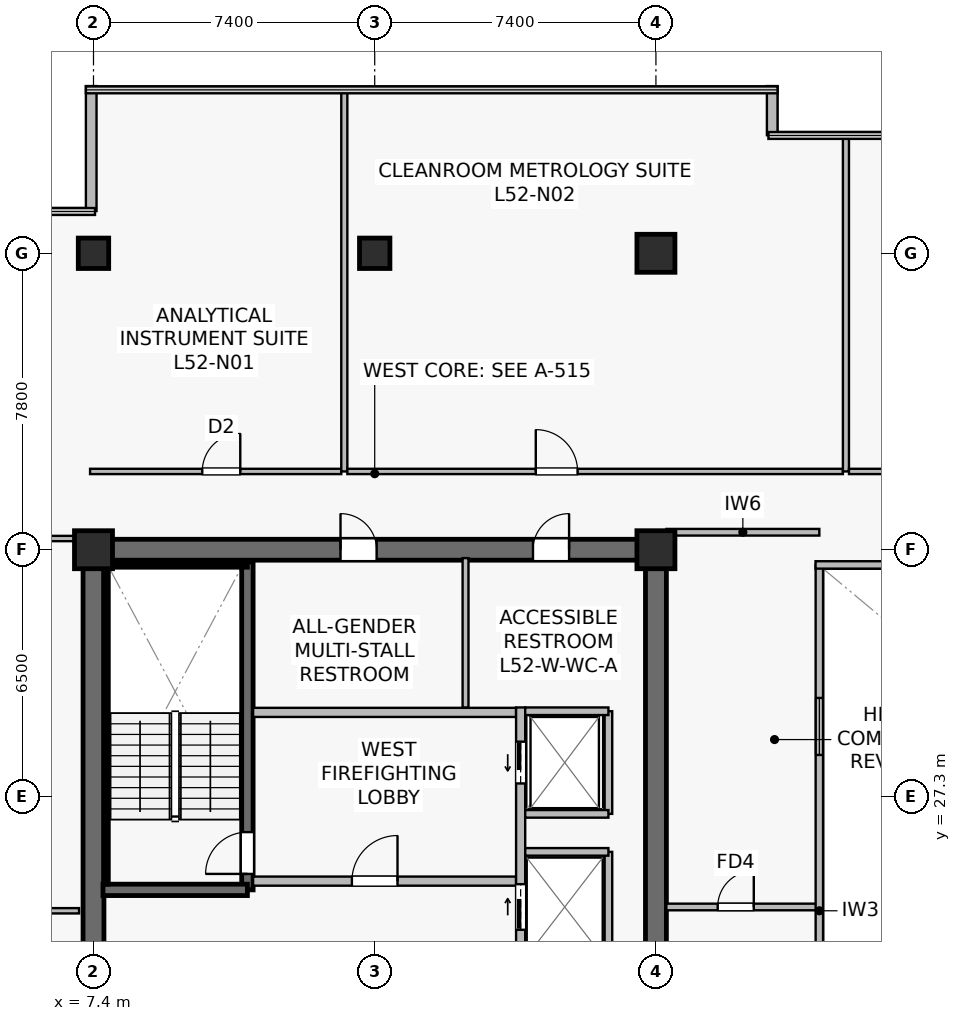
"""IFC4 building model, lengths in metres.
Left out: names, types, materials, properties, quantities, classifications, styles, units other than length and angle.
Written with IfcOpenShell. Run it as: python <this file> out.ifc"""

import sys

from ifc_helpers import new_model, si_unit, direction, frame, frame_2d, origin, origin_2d, place, context, subcontext, project, spatial, rectangle, extrude, source, transform, mapped, element, fill, save


model = new_model("IFC4")
c1 = context("Model", 3, precision=1e-05, world=origin(), true_north=direction((0.0, 1.0)))
c2 = subcontext(c1, "Body", "Model", "MODEL_VIEW")
j1 = project(units=[si_unit("LENGTHUNIT", "METRE"), si_unit("PLANEANGLEUNIT", "RADIAN")], contexts=[c1])
p1 = place(None, origin())
s1 = spatial("IfcSite", under=j1, at=p1, CompositionType="ELEMENT")
p2 = place(p1, origin())
s2 = spatial("IfcBuilding", under=s1, at=p2, CompositionType="ELEMENT")
p3 = place(p2, frame((0.0, 0.0, 217.8)))
s3 = spatial("IfcBuildingStorey", under=s2, at=p3, CompositionType="ELEMENT", Elevation=217.8)
p4 = place(p3, frame((7.125, 33.8, 0.0), z_axis=(0.0, 0.0, 1.0), x_axis=(1.0, 0.0, 0.0)))
e1 = element("IfcWall", 1, at=p4, inside=s3, PredefinedType="SHEAR", context=c2, shape_type="SweptSolid", body=[
    extrude(rectangle(XDim=15.35, YDim=0.55, at=frame_2d((7.675, 0.0))), origin(), (0.0, 0.0, 1.0), 3.8),
])
p5 = place(p4, frame((6.775, 0.0, 0.0)))
e2 = element("IfcOpeningElement", 2, at=p5, cuts=e1, PredefinedType="OPENING", context=c2, shape_type="SweptSolid", body=[
    extrude(rectangle(XDim=0.95, YDim=2.15, at=frame_2d((0.475, 1.075))), frame((0.0, 0.285, 0.0), z_axis=(0.0, -1.0, 0.0), x_axis=(1.0, 0.0, 0.0)), (0.0, 0.0, 1.0), 0.57),
])
p6 = place(p4, frame((11.84, 0.0, 0.0)))
e3 = element("IfcOpeningElement", 3, at=p6, cuts=e1, PredefinedType="OPENING", context=c2, shape_type="SweptSolid", body=[
    extrude(rectangle(XDim=0.95, YDim=2.15, at=frame_2d((0.475, 1.075))), frame((0.0, 0.285, 0.0), z_axis=(0.0, -1.0, 0.0), x_axis=(1.0, 0.0, 0.0)), (0.0, 0.0, 1.0), 0.57),
])
p7 = place(p3, frame((7.4, 15.075, 0.0), z_axis=(0.0, 0.0, 1.0), x_axis=(0.0, 1.0, 0.0)))
e4 = element("IfcWall", 4, at=p7, inside=s3, PredefinedType="SHEAR", context=c2, shape_type="SweptSolid", body=[
    extrude(rectangle(XDim=18.45, YDim=0.55, at=frame_2d((9.225, 0.0))), origin(), (0.0, 0.0, 1.0), 3.8),
])
p8 = place(p3, frame((22.2, 15.075, 0.0), z_axis=(0.0, 0.0, 1.0), x_axis=(0.0, 1.0, 0.0)))
e5 = element("IfcWall", 5, at=p8, inside=s3, PredefinedType="SHEAR", context=c2, shape_type="SweptSolid", body=[
    extrude(rectangle(XDim=18.45, YDim=0.55, at=frame_2d((9.225, 0.0))), origin(), (0.0, 0.0, 1.0), 3.8),
])
p9 = place(p8, frame((3.475, 0.0, 0.0)))
e6 = element("IfcOpeningElement", 6, at=p9, cuts=e5, PredefinedType="OPENING", context=c2, shape_type="SweptSolid", body=[
    extrude(rectangle(XDim=1.42, YDim=2.2, at=frame_2d((0.71, 1.1))), frame((0.0, 0.285, 0.0), z_axis=(0.0, -1.0, 0.0), x_axis=(1.0, 0.0, 0.0)), (0.0, 0.0, 1.0), 0.57),
])
p10 = place(p3, frame((11.45, 24.85, 0.0), z_axis=(0.0, 0.0, 1.0), x_axis=(0.0, 1.0, 0.0)))
e7 = element("IfcWall", 7, at=p10, inside=s3, PredefinedType="SHEAR", context=c2, shape_type="SweptSolid", body=[
    extrude(rectangle(XDim=8.63, YDim=0.3, at=frame_2d((4.315, 0.0))), origin(), (0.0, 0.0, 1.0), 3.8),
])
p11 = place(p10, frame((0.42, 0.0, 0.0)))
e8 = element("IfcOpeningElement", 8, at=p11, cuts=e7, PredefinedType="OPENING", context=c2, shape_type="SweptSolid", body=[
    extrude(rectangle(XDim=1.1, YDim=2.15, at=frame_2d((0.55, 1.075))), frame((0.0, 0.16, 0.0), z_axis=(0.0, -1.0, 0.0), x_axis=(1.0, 0.0, 0.0)), (0.0, 0.0, 1.0), 0.32),
])
p12 = place(p3, frame((7.65, 24.85, 0.0), z_axis=(0.0, 0.0, 1.0), x_axis=(1.0, 0.0, 0.0)))
e9 = element("IfcWall", 9, at=p12, inside=s3, PredefinedType="SHEAR", context=c2, shape_type="SweptSolid", body=[
    extrude(rectangle(XDim=3.8, YDim=0.3, at=frame_2d((1.9, 0.0))), origin(), (0.0, 0.0, 1.0), 3.8),
])
p13 = place(p3, frame((7.73, 33.4, 0.0), z_axis=(0.0, 0.0, 1.0), x_axis=(1.0, 0.0, 0.0)))
e10 = element("IfcWall", 10, at=p13, inside=s3, PredefinedType="SOLIDWALL", context=c2, shape_type="SweptSolid", body=[
    extrude(rectangle(XDim=3.72, YDim=0.12, at=frame_2d((1.86, 0.0))), origin(), (0.0, 0.0, 1.0), 3.8),
])
p14 = place(p3, frame((7.73, 25.0, 0.0), z_axis=(0.0, 0.0, 1.0), x_axis=(0.0, 1.0, 0.0)))
e11 = element("IfcWall", 11, at=p14, inside=s3, PredefinedType="SOLIDWALL", context=c2, shape_type="SweptSolid", body=[
    extrude(rectangle(XDim=8.32, YDim=0.12, at=frame_2d((4.16, 0.0))), origin(), (0.0, 0.0, 1.0), 3.8),
])
m1 = source(origin(), c2, "Body", "SweptSolid", [
    extrude(rectangle(XDim=1.0, YDim=1.0, at=origin_2d()), origin(), (0.0, 0.0, 1.0), 4.1),
])
for number, where, z_axis, x_axis in (
    (12, (7.4, 33.8, 0.0), (0.0, 0.0, 1.0), (1.0, 0.0, 0.0)),
    (13, (22.2, 33.8, 0.0), (0.0, 0.0, 1.0), (1.0, 0.0, 0.0)),
):
    element("IfcColumn", number, at=place(p3, frame(where, z_axis=z_axis, x_axis=x_axis)), inside=s3, PredefinedType="COLUMN", context=c2, shape_type="MappedRepresentation", body=[
        mapped(m1, transform((0.0, 0.0, 0.0), scale=1.0)),
    ])
m2 = source(origin(), c2, "Body", "SweptSolid", [
    extrude(rectangle(XDim=0.8, YDim=0.8, at=origin_2d()), origin(), (0.0, 0.0, 1.0), 4.1),
])
p15 = place(p3, frame((14.8, 41.6, 0.0), z_axis=(0.0, 0.0, 1.0), x_axis=(1.0, 0.0, 0.0)))
e14 = element("IfcColumn", 14, at=p15, inside=s3, PredefinedType="COLUMN", context=c2, shape_type="MappedRepresentation", body=[
    mapped(m2, transform((0.0, 0.0, 0.0), scale=1.0)),
])
p16 = place(p3, frame((22.2, 41.6, 0.0), z_axis=(0.0, 0.0, 1.0), x_axis=(1.0, 0.0, 0.0)))
e15 = element("IfcColumn", 15, at=p16, inside=s3, PredefinedType="COLUMN", context=c2, shape_type="MappedRepresentation", body=[
    mapped(m1, transform((0.0, 0.0, 0.0), scale=1.0)),
])
p17 = place(p3, frame((7.4, 41.6, 0.0), z_axis=(0.0, 0.0, 1.0), x_axis=(1.0, 0.0, 0.0)))
e16 = element("IfcColumn", 16, at=p17, inside=s3, PredefinedType="COLUMN", context=c2, shape_type="MappedRepresentation", body=[
    mapped(m2, transform((0.0, 0.0, 0.0), scale=1.0)),
])
p18 = place(p3, frame((25.26, 44.707, 0.0), z_axis=(0.0, 0.0, 1.0), x_axis=(0.0, 1.0, 0.0)))
e17 = element("IfcWall", 17, at=p18, inside=s3, PredefinedType="STANDARD", context=c2, shape_type="SweptSolid", body=[
    extrude(rectangle(XDim=1.293, YDim=0.28, at=frame_2d((0.646, 0.0))), origin(), (0.0, 0.0, 1.0), 3.8),
])
p19 = place(p3, frame((7.34, 46.0, 0.0), z_axis=(0.0, 0.0, 1.0), x_axis=(0.0, -1.0, 0.0)))
e18 = element("IfcWall", 18, at=p19, inside=s3, PredefinedType="STANDARD", context=c2, shape_type="SweptSolid", body=[
    extrude(rectangle(XDim=3.288, YDim=0.28, at=frame_2d((1.644, 0.0))), origin(), (0.0, 0.0, 1.0), 3.8),
])
p20 = place(p3, frame((11.6, 25.08, 0.0), z_axis=(0.0, 0.0, 1.0), x_axis=(1.0, 0.0, 0.0)))
e19 = element("IfcWall", 19, at=p20, inside=s3, PredefinedType="SOLIDWALL", context=c2, shape_type="SweptSolid", body=[
    extrude(rectangle(XDim=6.92, YDim=0.24, at=frame_2d((3.46, 0.0))), origin(), (0.0, 0.0, 1.0), 3.197),
])
p21 = place(p20, frame((2.6, 0.0, 0.0)))
e20 = element("IfcOpeningElement", 20, at=p21, cuts=e19, PredefinedType="OPENING", context=c2, shape_type="SweptSolid", body=[
    extrude(rectangle(XDim=1.2, YDim=2.16, at=frame_2d((0.6, 1.08))), frame((0.0, 0.13, 0.0), z_axis=(0.0, -1.0, 0.0), x_axis=(1.0, 0.0, 0.0)), (0.0, 0.0, 1.0), 0.26),
])
p22 = place(p3, frame((11.6, 29.52, 0.0), z_axis=(0.0, 0.0, 1.0), x_axis=(1.0, 0.0, 0.0)))
e21 = element("IfcWall", 21, at=p22, inside=s3, PredefinedType="SOLIDWALL", context=c2, shape_type="SweptSolid", body=[
    extrude(rectangle(XDim=6.92, YDim=0.24, at=frame_2d((3.46, 0.0))), origin(), (0.0, 0.0, 1.0), 3.197),
])
p23 = place(p3, frame((18.64, 22.8, 0.0), z_axis=(0.0, 0.0, 1.0), x_axis=(0.0, 1.0, 0.0)))
e22 = element("IfcWall", 22, at=p23, inside=s3, PredefinedType="SOLIDWALL", context=c2, shape_type="SweptSolid", body=[
    extrude(rectangle(XDim=6.85, YDim=0.24, at=frame_2d((3.425, 0.0))), origin(), (0.0, 0.0, 1.0), 2.935),
])
p24 = place(p23, frame((4.85, 0.0, 0.0)))
e23 = element("IfcOpeningElement", 23, at=p24, cuts=e22, PredefinedType="OPENING", context=c2, shape_type="SweptSolid", body=[
    extrude(rectangle(XDim=1.1, YDim=2.22, at=frame_2d((0.55, 1.11))), frame((0.0, 0.13, 0.0), z_axis=(0.0, -1.0, 0.0), x_axis=(1.0, 0.0, 0.0)), (0.0, 0.0, 1.0), 0.26),
])
p25 = place(p23, frame((1.0, 0.0, 0.0)))
e24 = element("IfcOpeningElement", 24, at=p25, cuts=e22, PredefinedType="OPENING", context=c2, shape_type="SweptSolid", body=[
    extrude(rectangle(XDim=1.2, YDim=2.22, at=frame_2d((0.6, 1.11))), frame((0.0, 0.13, 0.0), z_axis=(0.0, -1.0, 0.0), x_axis=(1.0, 0.0, 0.0)), (0.0, 0.0, 1.0), 0.26),
])
p26 = place(p3, frame((20.95, 26.85, 0.0), z_axis=(0.0, 0.0, 1.0), x_axis=(0.0, 1.0, 0.0)))
e25 = element("IfcWall", 25, at=p26, inside=s3, PredefinedType="SOLIDWALL", context=c2, shape_type="SweptSolid", body=[
    extrude(rectangle(XDim=2.7, YDim=0.2, at=frame_2d((1.35, 0.0))), origin(), (0.0, 0.0, 1.0), 3.8),
])
p27 = place(p3, frame((18.76, 29.55, 0.0), z_axis=(0.0, 0.0, 1.0), x_axis=(1.0, 0.0, 0.0)))
e26 = element("IfcWall", 26, at=p27, inside=s3, PredefinedType="SOLIDWALL", context=c2, shape_type="SweptSolid", body=[
    extrude(rectangle(XDim=2.19, YDim=0.2, at=frame_2d((1.095, 0.0))), origin(), (0.0, 0.0, 1.0), 3.8),
])
p28 = place(p3, frame((18.76, 26.85, 0.0), z_axis=(0.0, 0.0, 1.0), x_axis=(1.0, 0.0, 0.0)))
e27 = element("IfcWall", 27, at=p28, inside=s3, PredefinedType="SOLIDWALL", context=c2, shape_type="SweptSolid", body=[
    extrude(rectangle(XDim=2.19, YDim=0.2, at=frame_2d((1.095, 0.0))), origin(), (0.0, 0.0, 1.0), 3.197),
])
p29 = place(p3, frame((20.95, 22.95, 0.0), z_axis=(0.0, 0.0, 1.0), x_axis=(0.0, 1.0, 0.0)))
e28 = element("IfcWall", 28, at=p29, inside=s3, PredefinedType="SOLIDWALL", context=c2, shape_type="SweptSolid", body=[
    extrude(rectangle(XDim=2.9, YDim=0.2, at=frame_2d((1.45, 0.0))), origin(), (0.0, 0.0, 1.0), 2.935),
])
p30 = place(p3, frame((18.76, 25.85, 0.0), z_axis=(0.0, 0.0, 1.0), x_axis=(1.0, 0.0, 0.0)))
e29 = element("IfcWall", 29, at=p30, inside=s3, PredefinedType="SOLIDWALL", context=c2, shape_type="SweptSolid", body=[
    extrude(rectangle(XDim=2.19, YDim=0.2, at=frame_2d((1.095, 0.0))), origin(), (0.0, 0.0, 1.0), 3.8),
])
p31 = place(p3, frame((17.19, 29.65, 0.0), z_axis=(0.0, 0.0, 1.0), x_axis=(0.0, 1.0, 0.0)))
e30 = element("IfcWall", 30, at=p31, inside=s3, PredefinedType="PLUMBINGWALL", context=c2, shape_type="SweptSolid", body=[
    extrude(rectangle(XDim=3.93, YDim=0.155, at=frame_2d((1.965, 0.0))), origin(), (0.0, 0.0, 1.0), 3.8),
])
p32 = place(p3, frame((22.475, 34.26, 0.0), z_axis=(0.0, 0.0, 1.0), x_axis=(1.0, 0.0, 0.0)))
e31 = element("IfcWall", 31, at=p32, inside=s3, PredefinedType="PARTITIONING", context=c2, shape_type="SweptSolid", body=[
    extrude(rectangle(XDim=4.025, YDim=0.175, at=frame_2d((2.012, 0.0))), origin(), (0.0, 0.0, 1.0), 3.485),
])
p33 = place(p3, frame((22.475, 24.4, 0.0), z_axis=(0.0, 0.0, 1.0), x_axis=(1.0, 0.0, 0.0)))
e32 = element("IfcWall", 32, at=p33, inside=s3, PredefinedType="PARTITIONING", context=c2, shape_type="SweptSolid", body=[
    extrude(rectangle(XDim=4.025, YDim=0.175, at=frame_2d((2.012, 0.0))), origin(), (0.0, 0.0, 1.0), 3.8),
])
p34 = place(p33, frame((1.35, 0.0, 0.0)))
e33 = element("IfcOpeningElement", 33, at=p34, cuts=e32, PredefinedType="OPENING", context=c2, shape_type="SweptSolid", body=[
    extrude(rectangle(XDim=0.95, YDim=2.15, at=frame_2d((0.475, 1.075))), frame((0.0, 0.098, 0.0), z_axis=(0.0, -1.0, 0.0), x_axis=(1.0, 0.0, 0.0)), (0.0, 0.0, 1.0), 0.195),
])
p35 = place(p3, frame((26.5, 15.2, 0.0), z_axis=(0.0, 0.0, 1.0), x_axis=(0.0, 1.0, 0.0)))
e34 = element("IfcWall", 34, at=p35, inside=s3, PredefinedType="SOLIDWALL", context=c2, shape_type="SweptSolid", body=[
    extrude(rectangle(XDim=18.2, YDim=0.195, at=frame_2d((9.1, 0.0))), origin(), (0.0, 0.0, 1.0), 3.8),
])
p36 = place(p35, frame((1.8, 0.0, 0.9)))
e35 = element("IfcOpeningElement", 35, at=p36, cuts=e34, PredefinedType="OPENING", context=c2, shape_type="SweptSolid", body=[
    extrude(rectangle(XDim=1.5, YDim=1.4, at=frame_2d((0.75, 0.7))), frame((0.0, 0.107, 0.0), z_axis=(0.0, -1.0, 0.0), x_axis=(1.0, 0.0, 0.0)), (0.0, 0.0, 1.0), 0.215),
])
p37 = place(p35, frame((13.2, 0.0, 0.9)))
e36 = element("IfcOpeningElement", 36, at=p37, cuts=e34, PredefinedType="OPENING", context=c2, shape_type="SweptSolid", body=[
    extrude(rectangle(XDim=1.5, YDim=1.4, at=frame_2d((0.75, 0.7))), frame((0.0, 0.107, 0.0), z_axis=(0.0, -1.0, 0.0), x_axis=(1.0, 0.0, 0.0)), (0.0, 0.0, 1.0), 0.215),
])
p38 = place(p3, frame((26.4, 33.4, 0.0), z_axis=(0.0, 0.0, 1.0), x_axis=(1.0, 0.0, 0.0)))
e37 = element("IfcWall", 37, at=p38, inside=s3, PredefinedType="SOLIDWALL", context=c2, shape_type="SweptSolid", body=[
    extrude(rectangle(XDim=22.0, YDim=0.195, at=frame_2d((11.0, 0.0))), origin(), (0.0, 0.0, 1.0), 3.8),
])
p39 = place(p3, frame((7.31, 35.86, 0.0), z_axis=(0.0, 0.0, 1.0), x_axis=(1.0, 0.0, 0.0)))
e38 = element("IfcWall", 38, at=p39, inside=s3, PredefinedType="PARTITIONING", context=c2, shape_type="SweptSolid", body=[
    extrude(rectangle(XDim=6.61, YDim=0.14, at=frame_2d((3.305, 0.0))), origin(), (0.0, 0.0, 1.0), 3.335),
])
p40 = place(p39, frame((2.952, 0.0, 0.0)))
e39 = element("IfcOpeningElement", 39, at=p40, cuts=e38, PredefinedType="OPENING", context=c2, shape_type="SweptSolid", body=[
    extrude(rectangle(XDim=1.0, YDim=2.15, at=frame_2d((0.5, 1.075))), frame((0.0, 0.08, 0.0), z_axis=(0.0, -1.0, 0.0), x_axis=(1.0, 0.0, 0.0)), (0.0, 0.0, 1.0), 0.16),
])
p41 = place(p3, frame((14.0, 35.86, 0.0), z_axis=(0.0, 0.0, 1.0), x_axis=(0.0, 1.0, 0.0)))
e40 = element("IfcWall", 40, at=p41, inside=s3, PredefinedType="PARTITIONING", context=c2, shape_type="SweptSolid", body=[
    extrude(rectangle(XDim=10.03, YDim=0.16, at=frame_2d((5.015, 0.0))), origin(), (0.0, 0.0, 1.0), 3.135),
])
p42 = place(p3, frame((14.08, 35.86, 0.0), z_axis=(0.0, 0.0, 1.0), x_axis=(1.0, 0.0, 0.0)))
e41 = element("IfcWall", 41, at=p42, inside=s3, PredefinedType="PARTITIONING", context=c2, shape_type="SweptSolid", body=[
    extrude(rectangle(XDim=13.04, YDim=0.14, at=frame_2d((6.52, 0.0))), origin(), (0.0, 0.0, 1.0), 3.197),
])
p43 = place(p42, frame((4.958, 0.0, 0.0)))
e42 = element("IfcOpeningElement", 42, at=p43, cuts=e41, PredefinedType="OPENING", context=c2, shape_type="SweptSolid", body=[
    extrude(rectangle(XDim=1.1, YDim=2.18, at=frame_2d((0.55, 1.09))), frame((0.0, 0.08, 0.0), z_axis=(0.0, -1.0, 0.0), x_axis=(1.0, 0.0, 0.0)), (0.0, 0.0, 1.0), 0.16),
])
p44 = place(p3, frame((27.2, 35.86, 0.0), z_axis=(0.0, 0.0, 1.0), x_axis=(0.0, 1.0, 0.0)))
e43 = element("IfcWall", 43, at=p44, inside=s3, PredefinedType="PARTITIONING", context=c2, shape_type="SweptSolid", body=[
    extrude(rectangle(XDim=8.83, YDim=0.16, at=frame_2d((4.415, 0.0))), origin(), (0.0, 0.0, 1.0), 3.135),
])
p45 = place(p3, frame((27.28, 35.86, 0.0), z_axis=(0.0, 0.0, 1.0), x_axis=(1.0, 0.0, 0.0)))
e44 = element("IfcWall", 44, at=p45, inside=s3, PredefinedType="PARTITIONING", context=c2, shape_type="SweptSolid", body=[
    extrude(rectangle(XDim=14.24, YDim=0.14, at=frame_2d((7.12, 0.0))), origin(), (0.0, 0.0, 1.0), 3.197),
])
p46 = place(p45, frame((6.943, 0.0, 0.0)))
e45 = element("IfcOpeningElement", 45, at=p46, cuts=e44, PredefinedType="OPENING", context=c2, shape_type="SweptSolid", body=[
    extrude(rectangle(XDim=1.1, YDim=2.18, at=frame_2d((0.55, 1.09))), frame((0.0, 0.08, 0.0), z_axis=(0.0, -1.0, 0.0), x_axis=(1.0, 0.0, 0.0)), (0.0, 0.0, 1.0), 0.16),
])
p47 = place(p3, frame((4.11, 24.3, 0.0), z_axis=(0.0, 0.0, 1.0), x_axis=(1.0, 0.0, 0.0)))
e46 = element("IfcWall", 46, at=p47, inside=s3, PredefinedType="PARTITIONING", context=c2, shape_type="SweptSolid", body=[
    extrude(rectangle(XDim=2.91, YDim=0.14, at=frame_2d((1.455, 0.0))), origin(), (0.0, 0.0, 1.0), 3.8),
])
p48 = place(p3, frame((4.11, 34.095, 0.0), z_axis=(0.0, 0.0, 1.0), x_axis=(1.0, 0.0, 0.0)))
e47 = element("IfcWall", 47, at=p48, inside=s3, PredefinedType="PARTITIONING", context=c2, shape_type="SweptSolid", body=[
    extrude(rectangle(XDim=2.91, YDim=0.14, at=frame_2d((1.455, 0.0))), origin(), (0.0, 0.0, 1.0), 3.8),
])
p49 = place(p48, frame((1.005, 0.0, 0.0)))
e48 = element("IfcOpeningElement", 48, at=p49, cuts=e47, PredefinedType="OPENING", context=c2, shape_type="SweptSolid", body=[
    extrude(rectangle(XDim=0.9, YDim=2.1, at=frame_2d((0.45, 1.05))), frame((0.0, 0.08, 0.0), z_axis=(0.0, -1.0, 0.0), x_axis=(1.0, 0.0, 0.0)), (0.0, 0.0, 1.0), 0.16),
])
m3 = source(origin(), c2, "Body", "SweptSolid", [
    extrude(rectangle(XDim=1.5, YDim=1.4, at=frame_2d((0.75, 0.7))), frame((0.0, 0.03, 0.0), z_axis=(0.0, -1.0, 0.0), x_axis=(1.0, 0.0, 0.0)), (0.0, 0.0, 1.0), 0.06),
])
p50 = place(p37, origin())
e49 = element("IfcWindow", 49, at=p50, inside=s3, PartitioningType="SINGLE_PANEL", PredefinedType="WINDOW", context=c2, shape_type="MappedRepresentation", body=[
    mapped(m3, transform((0.0, 0.0, 0.0), scale=1.0)),
])
fill(e36, e49)
m4 = source(origin(), c2, "Body", "SweptSolid", [
    extrude(rectangle(XDim=1.1, YDim=2.15, at=frame_2d((0.55, 1.075))), frame((0.0, 0.025, 0.0), z_axis=(0.0, -1.0, 0.0), x_axis=(1.0, 0.0, 0.0)), (0.0, 0.0, 1.0), 0.05),
])
p51 = place(p11, origin())
e50 = element("IfcDoor", 50, at=p51, inside=s3, OperationType="SINGLE_SWING_LEFT", PredefinedType="DOOR", context=c2, shape_type="MappedRepresentation", body=[
    mapped(m4, transform((0.0, 0.0, 0.0), scale=1.0)),
])
fill(e8, e50)
m5 = source(origin(), c2, "Body", "SweptSolid", [
    extrude(rectangle(XDim=1.2, YDim=2.16, at=frame_2d((0.6, 1.08))), frame((0.0, 0.025, 0.0), z_axis=(0.0, -1.0, 0.0), x_axis=(1.0, 0.0, 0.0)), (0.0, 0.0, 1.0), 0.05),
])
p52 = place(p21, origin())
e51 = element("IfcDoor", 51, at=p52, inside=s3, OperationType="SINGLE_SWING_RIGHT", PredefinedType="DOOR", context=c2, shape_type="MappedRepresentation", body=[
    mapped(m5, transform((0.0, 0.0, 0.0), scale=1.0)),
])
fill(e20, e51)
m6 = source(origin(), c2, "Body", "SweptSolid", [
    extrude(rectangle(XDim=1.1, YDim=2.22, at=frame_2d((0.55, 1.11))), frame((0.0, 0.025, 0.0), z_axis=(0.0, -1.0, 0.0), x_axis=(1.0, 0.0, 0.0)), (0.0, 0.0, 1.0), 0.05),
])
p53 = place(p24, origin())
e52 = element("IfcDoor", 52, at=p53, inside=s3, OperationType="SLIDING_TO_LEFT", PredefinedType="USERDEFINED", context=c2, shape_type="MappedRepresentation", body=[
    mapped(m6, transform((0.0, 0.0, 0.0), scale=1.0)),
])
fill(e23, e52)
m7 = source(origin(), c2, "Body", "SweptSolid", [
    extrude(rectangle(XDim=1.2, YDim=2.22, at=frame_2d((0.6, 1.11))), frame((0.0, 0.025, 0.0), z_axis=(0.0, -1.0, 0.0), x_axis=(1.0, 0.0, 0.0)), (0.0, 0.0, 1.0), 0.05),
])
p54 = place(p25, origin())
e53 = element("IfcDoor", 53, at=p54, inside=s3, OperationType="SLIDING_TO_RIGHT", PredefinedType="USERDEFINED", context=c2, shape_type="MappedRepresentation", body=[
    mapped(m7, transform((0.0, 0.0, 0.0), scale=1.0)),
])
fill(e24, e53)
m8 = source(origin(), c2, "Body", "SweptSolid", [
    extrude(rectangle(XDim=0.95, YDim=2.15, at=frame_2d((0.475, 1.075))), frame((0.0, 0.025, 0.0), z_axis=(0.0, -1.0, 0.0), x_axis=(1.0, 0.0, 0.0)), (0.0, 0.0, 1.0), 0.05),
])
p55 = place(p5, origin())
e54 = element("IfcDoor", 54, at=p55, inside=s3, OperationType="SINGLE_SWING_LEFT", PredefinedType="DOOR", context=c2, shape_type="MappedRepresentation", body=[
    mapped(m8, transform((0.0, 0.0, 0.0), scale=1.0)),
])
fill(e2, e54)
p56 = place(p6, origin())
e55 = element("IfcDoor", 55, at=p56, inside=s3, OperationType="SINGLE_SWING_RIGHT", PredefinedType="DOOR", context=c2, shape_type="MappedRepresentation", body=[
    mapped(m8, transform((0.0, 0.0, 0.0), scale=1.0)),
])
fill(e3, e55)
p57 = place(p34, origin())
e56 = element("IfcDoor", 56, at=p57, inside=s3, OperationType="SINGLE_SWING_RIGHT", PredefinedType="DOOR", context=c2, shape_type="MappedRepresentation", body=[
    mapped(m8, transform((0.0, 0.0, 0.0), scale=1.0)),
])
fill(e33, e56)
m9 = source(origin(), c2, "Body", "SweptSolid", [
    extrude(rectangle(XDim=1.0, YDim=2.15, at=frame_2d((0.5, 1.075))), frame((0.0, 0.025, 0.0), z_axis=(0.0, -1.0, 0.0), x_axis=(1.0, 0.0, 0.0)), (0.0, 0.0, 1.0), 0.05),
])
p58 = place(p40, origin())
e57 = element("IfcDoor", 57, at=p58, inside=s3, OperationType="SINGLE_SWING_RIGHT", PredefinedType="DOOR", context=c2, shape_type="MappedRepresentation", body=[
    mapped(m9, transform((0.0, 0.0, 0.0), scale=1.0)),
])
fill(e39, e57)
m10 = source(origin(), c2, "Body", "SweptSolid", [
    extrude(rectangle(XDim=1.1, YDim=2.18, at=frame_2d((0.55, 1.09))), frame((0.0, 0.025, 0.0), z_axis=(0.0, -1.0, 0.0), x_axis=(1.0, 0.0, 0.0)), (0.0, 0.0, 1.0), 0.05),
])
p59 = place(p43, origin())
e58 = element("IfcDoor", 58, at=p59, inside=s3, OperationType="SINGLE_SWING_LEFT", PredefinedType="DOOR", context=c2, shape_type="MappedRepresentation", body=[
    mapped(m10, transform((0.0, 0.0, 0.0), scale=1.0)),
])
fill(e42, e58)
save(model, sys.argv[1])
